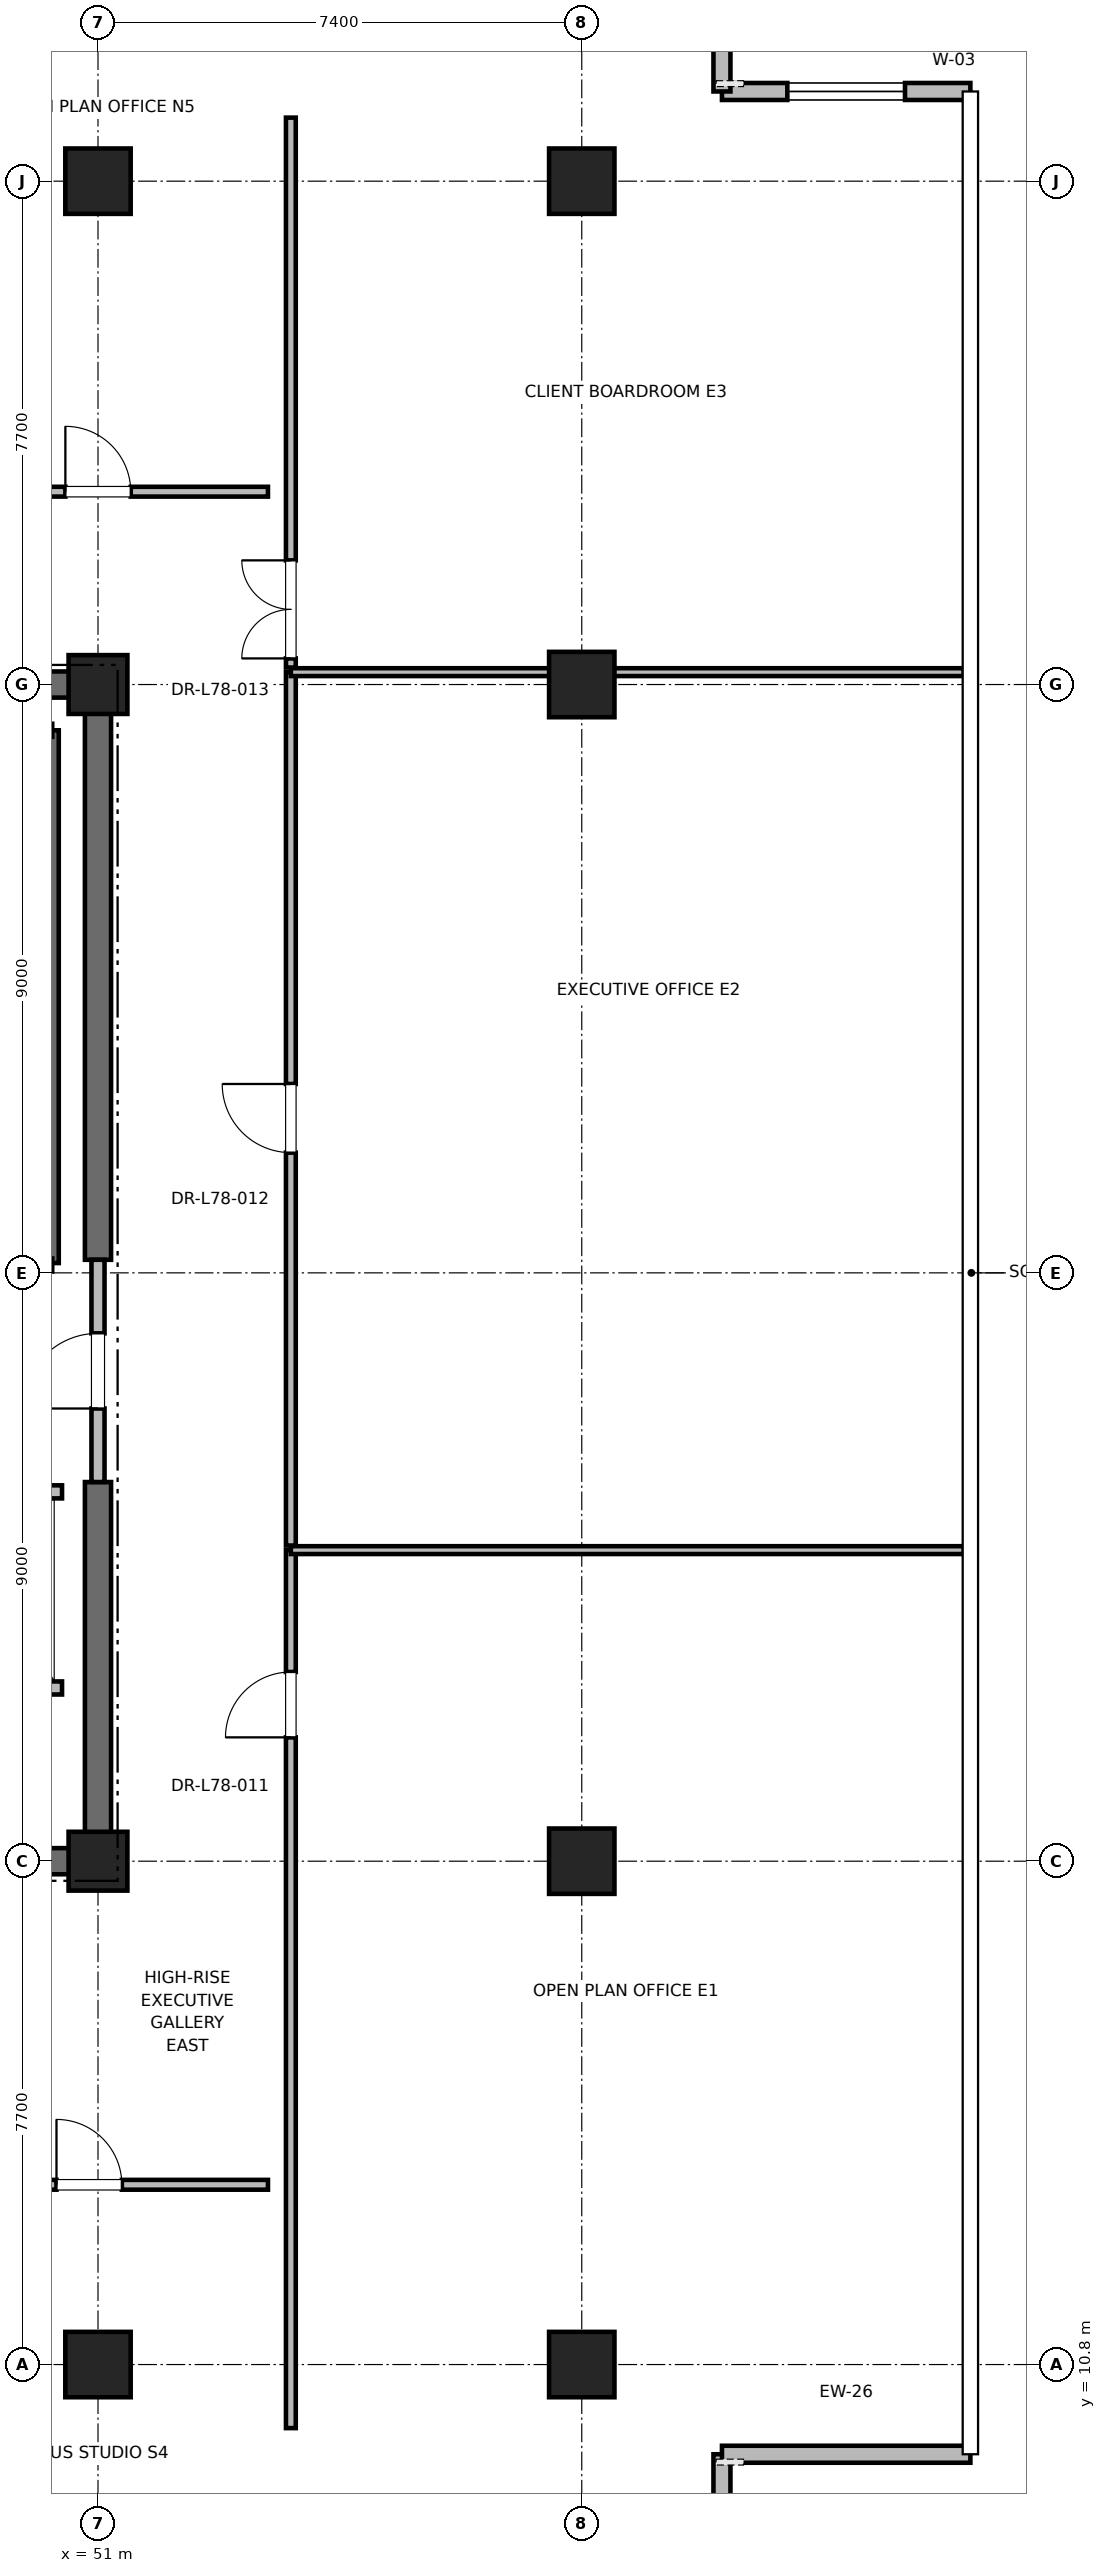
"""IFC4 building model, lengths in metres.
Left out: names, types, materials, properties, quantities, classifications, styles, units other than length and angle.
Written with IfcOpenShell. Run it as: python <this file> out.ifc"""

import sys

from ifc_helpers import new_model, si_unit, direction, frame, frame_2d, origin, origin_2d, place, context, subcontext, project, spatial, rectangle, extrude, element, fill, save


model = new_model("IFC4")
c1 = context("Model", 3, precision=1e-05, world=origin(), true_north=direction((0.0, 1.0)))
c2 = subcontext(c1, "Body", "Model", "MODEL_VIEW")
j1 = project(units=[si_unit("LENGTHUNIT", "METRE"), si_unit("PLANEANGLEUNIT", "RADIAN")], contexts=[c1])
p1 = place(None, origin())
s1 = spatial("IfcSite", under=j1, at=p1, CompositionType="ELEMENT")
p2 = place(p1, origin())
s2 = spatial("IfcBuilding", under=s1, at=p2, CompositionType="ELEMENT")
p3 = place(p2, frame((0.0, 0.0, 334.8)))
s3 = spatial("IfcBuildingStorey", under=s2, at=p3, CompositionType="ELEMENT", Elevation=334.8)
for number, where, z_axis, x_axis in (
    (1, (51.0, 10.8, 0.0), (0.0, 0.0, 1.0), (1.0, 0.0, 0.0)),
    (2, (51.0, 44.2, 0.0), (0.0, 0.0, 1.0), (1.0, 0.0, 0.0)),
    (3, (58.4, 18.5, 0.0), (0.0, 0.0, 1.0), (1.0, 0.0, 0.0)),
    (4, (58.4, 36.5, 0.0), (0.0, 0.0, 1.0), (1.0, 0.0, 0.0)),
    (5, (58.4, 10.8, 0.0), (0.0, 0.0, 1.0), (1.0, 0.0, 0.0)),
    (6, (58.4, 44.2, 0.0), (0.0, 0.0, 1.0), (1.0, 0.0, 0.0)),
):
    element("IfcColumn", number, at=place(p3, frame(where, z_axis=z_axis, x_axis=x_axis)), inside=s3, PredefinedType="COLUMN", context=c2, shape_type="SweptSolid", body=[
        extrude(rectangle(XDim=1.0, YDim=1.0, at=origin_2d()), origin(), (0.0, 0.0, 1.0), 4.0),
    ])
for number, where, z_axis, x_axis in (
    (7, (51.0, 18.5, 0.0), (0.0, 0.0, 1.0), (1.0, 0.0, 0.0)),
    (8, (51.0, 36.5, 0.0), (0.0, 0.0, 1.0), (1.0, 0.0, 0.0)),
):
    element("IfcColumn", number, at=place(p3, frame(where, z_axis=z_axis, x_axis=x_axis)), inside=s3, PredefinedType="PILASTER", context=c2, shape_type="SweptSolid", body=[
        extrude(rectangle(XDim=0.9, YDim=0.9, at=origin_2d()), origin(), (0.0, 0.0, 1.0), 4.0),
    ])
p4 = place(p3, frame((41.8, 18.5, 0.0), z_axis=(0.0, 0.0, 1.0), x_axis=(1.0, 0.0, 0.0)))
e9 = element("IfcWall", 9, at=p4, inside=s3, PredefinedType="SHEAR", context=c2, shape_type="SweptSolid", body=[
    extrude(rectangle(XDim=9.2, YDim=0.4, at=frame_2d((4.6, 0.0))), origin(), (0.0, 0.0, 1.0), 3.785),
])
for number, where, z_axis, x_axis in (
    (10, (45.2, 36.5, 0.0), (0.0, 0.0, 1.0), (1.0, 0.0, 0.0)),
    (11, (51.0, 18.5, 0.0), (0.0, 0.0, 1.0), (0.0, 1.0, 0.0)),
):
    element("IfcWall", number, at=place(p3, frame(where, z_axis=z_axis, x_axis=x_axis)), inside=s3, PredefinedType="SHEAR", context=c2, shape_type="SweptSolid", body=[
        extrude(rectangle(XDim=5.8, YDim=0.4, at=frame_2d((2.9, 0.0))), origin(), (0.0, 0.0, 1.0), 3.785),
    ])
p5 = place(p3, frame((51.0, 27.7, 0.0), z_axis=(0.0, 0.0, 1.0), x_axis=(0.0, 1.0, 0.0)))
e12 = element("IfcWall", 12, at=p5, inside=s3, PredefinedType="SHEAR", context=c2, shape_type="SweptSolid", body=[
    extrude(rectangle(XDim=8.8, YDim=0.4, at=frame_2d((4.4, 0.0))), origin(), (0.0, 0.0, 1.0), 3.785),
])
p6 = place(p3, frame((60.544, 6.128, 0.0), z_axis=(0.0, 0.0, 1.0), x_axis=(0.0, 1.0, 0.0)))
e13 = element("IfcWall", 13, at=p6, inside=s3, PredefinedType="PARAPET", context=c2, shape_type="SweptSolid", body=[
    extrude(rectangle(XDim=3.3, YDim=0.26, at=frame_2d((1.65, 0.0))), origin(), (0.0, 0.0, 1.0), 3.785),
])
p7 = place(p6, frame((0.75, 0.0, 0.85)))
e14 = element("IfcOpeningElement", 14, at=p7, cuts=e13, PredefinedType="OPENING", context=c2, shape_type="SweptSolid", body=[
    extrude(rectangle(XDim=1.8, YDim=2.2, at=frame_2d((0.9, 1.1))), frame((0.0, 0.13, 0.0), z_axis=(0.0, -1.0, 0.0), x_axis=(1.0, 0.0, 0.0)), (0.0, 0.0, 1.0), 0.26),
])
p8 = place(p3, frame((60.544, 9.428, 0.0), z_axis=(0.0, 0.0, 1.0), x_axis=(1.0, 0.0, 0.0)))
e15 = element("IfcWall", 15, at=p8, inside=s3, PredefinedType="PARAPET", context=c2, shape_type="SweptSolid", body=[
    extrude(rectangle(XDim=3.8, YDim=0.26, at=frame_2d((1.9, 0.0))), origin(), (0.0, 0.0, 1.0), 3.785),
])
p9 = place(p3, frame((64.344, 45.572, 0.0), z_axis=(0.0, 0.0, 1.0), x_axis=(-1.0, 0.0, 0.0)))
e16 = element("IfcWall", 16, at=p9, inside=s3, PredefinedType="PARAPET", context=c2, shape_type="SweptSolid", body=[
    extrude(rectangle(XDim=3.8, YDim=0.26, at=frame_2d((1.9, 0.0))), origin(), (0.0, 0.0, 1.0), 3.785),
])
p10 = place(p9, frame((1.0, 0.0, 0.85)))
e17 = element("IfcOpeningElement", 17, at=p10, cuts=e16, PredefinedType="OPENING", context=c2, shape_type="SweptSolid", body=[
    extrude(rectangle(XDim=1.8, YDim=2.2, at=frame_2d((0.9, 1.1))), frame((0.0, 0.13, 0.0), z_axis=(0.0, -1.0, 0.0), x_axis=(1.0, 0.0, 0.0)), (0.0, 0.0, 1.0), 0.26),
])
p11 = place(p3, frame((60.544, 45.572, 0.0), z_axis=(0.0, 0.0, 1.0), x_axis=(0.0, 1.0, 0.0)))
e18 = element("IfcWall", 18, at=p11, inside=s3, PredefinedType="PARAPET", context=c2, shape_type="SweptSolid", body=[
    extrude(rectangle(XDim=3.3, YDim=0.26, at=frame_2d((1.65, 0.0))), origin(), (0.0, 0.0, 1.0), 3.785),
])
p12 = place(p3, frame((50.3, 27.65, 0.0), z_axis=(0.0, 0.0, 1.0), x_axis=(0.0, 1.0, 0.0)))
e19 = element("IfcWall", 19, at=p12, inside=s3, PredefinedType="SOLIDWALL", context=c2, shape_type="SweptSolid", body=[
    extrude(rectangle(XDim=8.15, YDim=0.2, at=frame_2d((4.075, 0.0))), origin(), (0.0, 0.0, 1.0), 3.785),
])
p13 = place(p3, frame((51.0, 24.3, 0.0), z_axis=(0.0, 0.0, 1.0), x_axis=(0.0, 1.0, 0.0)))
e20 = element("IfcWall", 20, at=p13, inside=s3, PredefinedType="PARTITIONING", context=c2, shape_type="SweptSolid", body=[
    extrude(rectangle(XDim=3.4, YDim=0.2, at=frame_2d((1.7, 0.0))), origin(), (0.0, 0.0, 1.0), 2.865),
])
p14 = place(p13, frame((1.125, 0.0, 0.0)))
e21 = element("IfcOpeningElement", 21, at=p14, cuts=e20, PredefinedType="OPENING", context=c2, shape_type="SweptSolid", body=[
    extrude(rectangle(XDim=1.15, YDim=2.2, at=frame_2d((0.575, 1.1))), frame((0.0, 0.1, 0.0), z_axis=(0.0, -1.0, 0.0), x_axis=(1.0, 0.0, 0.0)), (0.0, 0.0, 1.0), 0.2),
])
p15 = place(p3, frame((47.85, 21.15, 0.0), z_axis=(0.0, 0.0, 1.0), x_axis=(1.0, 0.0, 0.0)))
e22 = element("IfcWall", 22, at=p15, inside=s3, PredefinedType="SOLIDWALL", context=c2, shape_type="SweptSolid", body=[
    extrude(rectangle(XDim=2.6, YDim=0.2, at=frame_2d((1.3, 0.0))), origin(), (0.0, 0.0, 1.0), 3.785),
])
p16 = place(p3, frame((50.45, 24.15, 0.0), z_axis=(0.0, 0.0, 1.0), x_axis=(-1.0, 0.0, 0.0)))
e23 = element("IfcWall", 23, at=p16, inside=s3, PredefinedType="SOLIDWALL", context=c2, shape_type="SweptSolid", body=[
    extrude(rectangle(XDim=2.6, YDim=0.2, at=frame_2d((1.3, 0.0))), origin(), (0.0, 0.0, 1.0), 2.865),
])
p17 = place(p16, frame((0.75, 0.0, 0.0)))
e24 = element("IfcOpeningElement", 24, at=p17, cuts=e23, PredefinedType="OPENING", context=c2, shape_type="SweptSolid", body=[
    extrude(rectangle(XDim=1.1, YDim=2.2, at=frame_2d((0.55, 1.1))), frame((0.0, 0.1, 0.0), z_axis=(0.0, -1.0, 0.0), x_axis=(1.0, 0.0, 0.0)), (0.0, 0.0, 1.0), 0.2),
])
p18 = place(p3, frame((48.502, 39.45, 0.0), z_axis=(0.0, 0.0, 1.0), x_axis=(1.0, 0.0, 0.0)))
e25 = element("IfcWall", 25, at=p18, inside=s3, PredefinedType="PARTITIONING", context=c2, shape_type="SweptSolid", body=[
    extrude(rectangle(XDim=5.098, YDim=0.15, at=frame_2d((2.549, 0.0))), origin(), (0.0, 0.0, 1.0), 2.85),
])
p19 = place(p18, frame((1.999, 0.0, 0.0)))
e26 = element("IfcOpeningElement", 26, at=p19, cuts=e25, PredefinedType="OPENING", context=c2, shape_type="SweptSolid", body=[
    extrude(rectangle(XDim=1.0, YDim=2.15, at=frame_2d((0.5, 1.075))), frame((0.0, 0.075, 0.0), z_axis=(0.0, -1.0, 0.0), x_axis=(1.0, 0.0, 0.0)), (0.0, 0.0, 1.0), 0.15),
])
p20 = place(p3, frame((48.23, 13.55, 0.0), z_axis=(0.0, 0.0, 1.0), x_axis=(1.0, 0.0, 0.0)))
e27 = element("IfcWall", 27, at=p20, inside=s3, PredefinedType="PARTITIONING", context=c2, shape_type="SweptSolid", body=[
    extrude(rectangle(XDim=5.37, YDim=0.15, at=frame_2d((2.685, 0.0))), origin(), (0.0, 0.0, 1.0), 2.85),
])
p21 = place(p20, frame((2.135, 0.0, 0.0)))
e28 = element("IfcOpeningElement", 28, at=p21, cuts=e27, PredefinedType="OPENING", context=c2, shape_type="SweptSolid", body=[
    extrude(rectangle(XDim=1.0, YDim=2.15, at=frame_2d((0.5, 1.075))), frame((0.0, 0.075, 0.0), z_axis=(0.0, -1.0, 0.0), x_axis=(1.0, 0.0, 0.0)), (0.0, 0.0, 1.0), 0.15),
])
p22 = place(p3, frame((53.95, 9.828, 0.0), z_axis=(0.0, 0.0, 1.0), x_axis=(0.0, 1.0, 0.0)))
e29 = element("IfcWall", 29, at=p22, inside=s3, PredefinedType="PARTITIONING", context=c2, shape_type="SweptSolid", body=[
    extrude(rectangle(XDim=13.431, YDim=0.15, at=frame_2d((6.715, 0.0))), origin(), (0.0, 0.0, 1.0), 2.85),
])
p23 = place(p22, frame((10.567, 0.0, 0.0)))
e30 = element("IfcOpeningElement", 30, at=p23, cuts=e29, PredefinedType="OPENING", context=c2, shape_type="SweptSolid", body=[
    extrude(rectangle(XDim=1.0, YDim=2.15, at=frame_2d((0.5, 1.075))), frame((0.0, 0.075, 0.0), z_axis=(0.0, -1.0, 0.0), x_axis=(1.0, 0.0, 0.0)), (0.0, 0.0, 1.0), 0.15),
])
p24 = place(p3, frame((53.95, 23.259, 0.0), z_axis=(0.0, 0.0, 1.0), x_axis=(1.0, 0.0, 0.0)))
e31 = element("IfcWall", 31, at=p24, inside=s3, PredefinedType="PARTITIONING", context=c2, shape_type="SweptSolid", body=[
    extrude(rectangle(XDim=10.294, YDim=0.12, at=frame_2d((5.147, 0.0))), origin(), (0.0, 0.0, 1.0), 2.85),
])
p25 = place(p3, frame((53.95, 23.329, 0.0), z_axis=(0.0, 0.0, 1.0), x_axis=(0.0, 1.0, 0.0)))
e32 = element("IfcWall", 32, at=p25, inside=s3, PredefinedType="PARTITIONING", context=c2, shape_type="SweptSolid", body=[
    extrude(rectangle(XDim=13.361, YDim=0.15, at=frame_2d((6.68, 0.0))), origin(), (0.0, 0.0, 1.0), 2.85),
])
p26 = place(p25, frame((6.011, 0.0, 0.0)))
e33 = element("IfcOpeningElement", 33, at=p26, cuts=e32, PredefinedType="OPENING", context=c2, shape_type="SweptSolid", body=[
    extrude(rectangle(XDim=1.05, YDim=2.2, at=frame_2d((0.525, 1.1))), frame((0.0, 0.075, 0.0), z_axis=(0.0, -1.0, 0.0), x_axis=(1.0, 0.0, 0.0)), (0.0, 0.0, 1.0), 0.15),
])
p27 = place(p3, frame((53.95, 36.689, 0.0), z_axis=(0.0, 0.0, 1.0), x_axis=(1.0, 0.0, 0.0)))
e34 = element("IfcWall", 34, at=p27, inside=s3, PredefinedType="PARTITIONING", context=c2, shape_type="SweptSolid", body=[
    extrude(rectangle(XDim=10.294, YDim=0.12, at=frame_2d((5.147, 0.0))), origin(), (0.0, 0.0, 1.0), 2.85),
])
p28 = place(p3, frame((53.95, 36.76, 0.0), z_axis=(0.0, 0.0, 1.0), x_axis=(0.0, 1.0, 0.0)))
e35 = element("IfcWall", 35, at=p28, inside=s3, PredefinedType="PARTITIONING", context=c2, shape_type="SweptSolid", body=[
    extrude(rectangle(XDim=8.413, YDim=0.15, at=frame_2d((4.206, 0.0))), origin(), (0.0, 0.0, 1.0), 2.85),
])
p29 = place(p28, frame((0.14, 0.0, 0.0)))
e36 = element("IfcOpeningElement", 36, at=p29, cuts=e35, PredefinedType="OPENING", context=c2, shape_type="SweptSolid", body=[
    extrude(rectangle(XDim=1.5, YDim=2.25, at=frame_2d((0.75, 1.125))), frame((0.0, 0.075, 0.0), z_axis=(0.0, -1.0, 0.0), x_axis=(1.0, 0.0, 0.0)), (0.0, 0.0, 1.0), 0.15),
])
p30 = place(p10, origin())
e37 = element("IfcWindow", 37, at=p30, inside=s3, PartitioningType="SINGLE_PANEL", PredefinedType="WINDOW", context=c2, shape_type="SweptSolid", body=[
    extrude(rectangle(XDim=1.8, YDim=2.2, at=frame_2d((0.9, 1.1))), frame((0.0, 0.03, 0.0), z_axis=(0.0, -1.0, 0.0), x_axis=(1.0, 0.0, 0.0)), (0.0, 0.0, 1.0), 0.06),
])
fill(e17, e37)
p31 = place(p14, origin())
e38 = element("IfcDoor", 38, at=p31, inside=s3, OperationType="SINGLE_SWING_LEFT", PredefinedType="DOOR", context=c2, shape_type="SweptSolid", body=[
    extrude(rectangle(XDim=1.15, YDim=2.2, at=frame_2d((0.575, 1.1))), frame((0.0, 0.025, 0.0), z_axis=(0.0, -1.0, 0.0), x_axis=(1.0, 0.0, 0.0)), (0.0, 0.0, 1.0), 0.05),
])
fill(e21, e38)
p32 = place(p19, origin())
e39 = element("IfcDoor", 39, at=p32, inside=s3, OperationType="SINGLE_SWING_LEFT", PredefinedType="DOOR", context=c2, shape_type="SweptSolid", body=[
    extrude(rectangle(XDim=1.0, YDim=2.15, at=frame_2d((0.5, 1.075))), frame((0.0, 0.025, 0.0), z_axis=(0.0, -1.0, 0.0), x_axis=(1.0, 0.0, 0.0)), (0.0, 0.0, 1.0), 0.05),
])
fill(e26, e39)
p33 = place(p21, origin())
e40 = element("IfcDoor", 40, at=p33, inside=s3, OperationType="SINGLE_SWING_LEFT", PredefinedType="DOOR", context=c2, shape_type="SweptSolid", body=[
    extrude(rectangle(XDim=1.0, YDim=2.15, at=frame_2d((0.5, 1.075))), frame((0.0, 0.025, 0.0), z_axis=(0.0, -1.0, 0.0), x_axis=(1.0, 0.0, 0.0)), (0.0, 0.0, 1.0), 0.05),
])
fill(e28, e40)
p34 = place(p23, origin())
e41 = element("IfcDoor", 41, at=p34, inside=s3, OperationType="SINGLE_SWING_LEFT", PredefinedType="DOOR", context=c2, shape_type="SweptSolid", body=[
    extrude(rectangle(XDim=1.0, YDim=2.15, at=frame_2d((0.5, 1.075))), frame((0.0, 0.025, 0.0), z_axis=(0.0, -1.0, 0.0), x_axis=(1.0, 0.0, 0.0)), (0.0, 0.0, 1.0), 0.05),
])
fill(e30, e41)
p35 = place(p26, origin())
e42 = element("IfcDoor", 42, at=p35, inside=s3, OperationType="SINGLE_SWING_RIGHT", PredefinedType="DOOR", context=c2, shape_type="SweptSolid", body=[
    extrude(rectangle(XDim=1.05, YDim=2.2, at=frame_2d((0.525, 1.1))), frame((0.0, 0.025, 0.0), z_axis=(0.0, -1.0, 0.0), x_axis=(1.0, 0.0, 0.0)), (0.0, 0.0, 1.0), 0.05),
])
fill(e33, e42)
p36 = place(p29, origin())
e43 = element("IfcDoor", 43, at=p36, inside=s3, OperationType="DOUBLE_DOOR_SINGLE_SWING", PredefinedType="DOOR", context=c2, shape_type="SweptSolid", body=[
    extrude(rectangle(XDim=1.5, YDim=2.25, at=frame_2d((0.75, 1.125))), frame((0.0, 0.025, 0.0), z_axis=(0.0, -1.0, 0.0), x_axis=(1.0, 0.0, 0.0)), (0.0, 0.0, 1.0), 0.05),
])
fill(e36, e43)
save(model, sys.argv[1])
